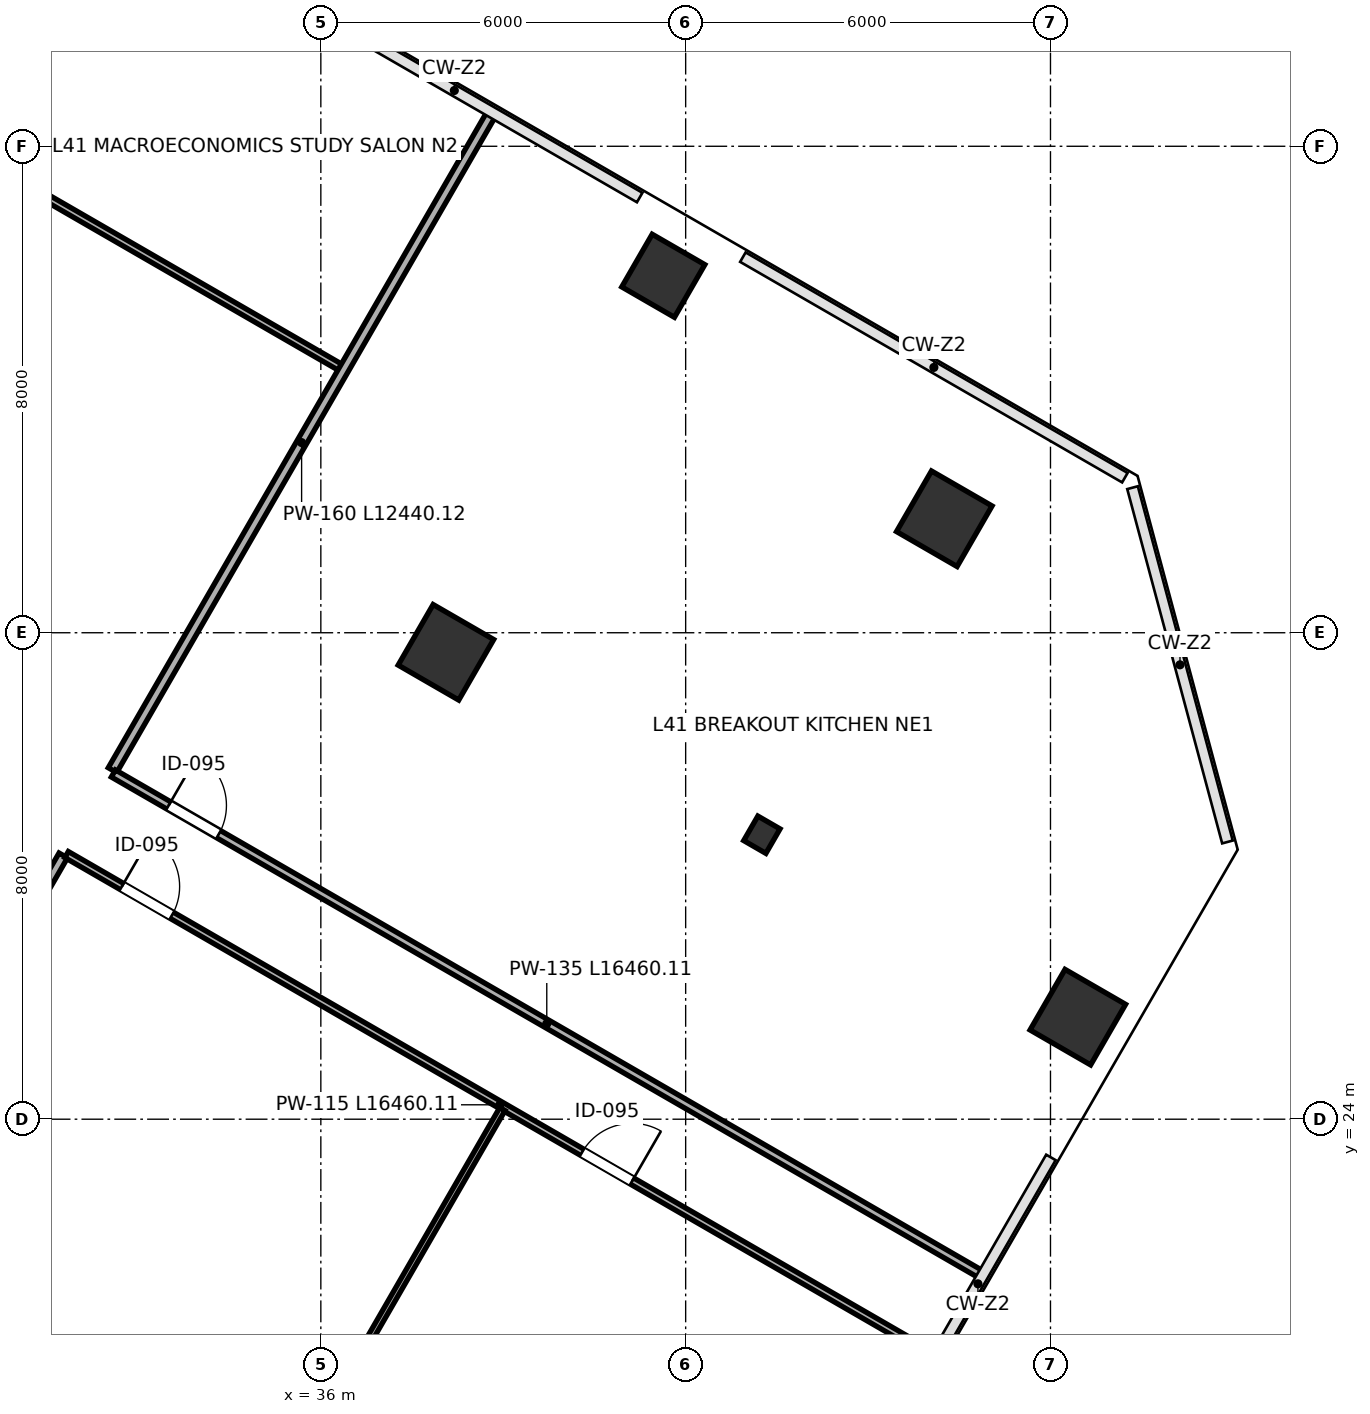
"""IFC4 building model, lengths in metres.
Left out: names, types, materials, properties, quantities, classifications, styles, units other than length and angle.
Written with IfcOpenShell. Run it as: python <this file> out.ifc"""

import sys

from ifc_helpers import new_model, si_unit, direction, frame, frame_2d, origin, origin_2d, place, context, subcontext, project, spatial, rectangle, i_section, extrude, clip, halfspace, source, transform, mapped, element, fill, save


model = new_model("IFC4")
c1 = context("Model", 3, precision=1e-05, world=origin(), true_north=direction((0.0, 1.0)))
c2 = subcontext(c1, "Body", "Model", "MODEL_VIEW")
j1 = project(units=[si_unit("LENGTHUNIT", "METRE"), si_unit("PLANEANGLEUNIT", "RADIAN")], contexts=[c1])
p1 = place(None, origin())
s1 = spatial("IfcSite", under=j1, at=p1, CompositionType="ELEMENT")
p2 = place(p1, origin())
s2 = spatial("IfcBuilding", under=s1, at=p2, CompositionType="ELEMENT")
p3 = place(p2, frame((0.0, 0.0, 183.4)))
s3 = spatial("IfcBuildingStorey", under=s2, at=p3, CompositionType="ELEMENT", Elevation=183.4)
p4 = place(p3, frame((33.838, 42.37, 0.0), z_axis=(0.103476944298, -0.128701240969, 0.986269999834), x_axis=(-0.98392787464, -0.158328979187, 0.082570405455)))
e1 = element("IfcColumn", 1, at=p4, inside=s3, PredefinedType="COLUMN", context=c2, shape_type="Clipping", body=[
    clip(clip(extrude(rectangle(XDim=1.0, YDim=1.0, at=origin_2d()), origin(), (0.0, 0.0, 1.0), 4.259), halfspace(frame((0.0, 0.0, 0.115), z_axis=(0.0, 0.0, -1.0), x_axis=(1.0, 0.0, 0.0)), False)), halfspace(frame((0.0, 0.0, 4.144), z_axis=(0.0, 0.0, 1.0), x_axis=(1.0, 0.0, 0.0)), False)),
])
p5 = place(p3, frame((38.057, 31.678, 0.0), z_axis=(-0.00698872096, -0.169390556383, 0.985524224556), x_axis=(-0.844976144841, 0.528043382637, 0.084767332759)))
e2 = element("IfcColumn", 2, at=p5, inside=s3, PredefinedType="COLUMN", context=c2, shape_type="Clipping", body=[
    clip(clip(extrude(rectangle(XDim=1.15, YDim=1.15, at=origin_2d()), origin(), (0.0, 0.0, 1.0), 4.262), halfspace(frame((0.0, 0.0, 0.136), z_axis=(0.0, 0.0, -1.0), x_axis=(1.0, 0.0, 0.0)), False)), halfspace(frame((0.0, 0.0, 4.126), z_axis=(0.0, 0.0, 1.0), x_axis=(1.0, 0.0, 0.0)), False)),
])
p6 = place(p3, frame((41.632, 37.87, 0.0), z_axis=(0.055146883204, -0.205593941504, 0.977082367301), x_axis=(-0.963025410697, 0.247496558509, 0.106430784445)))
e3 = element("IfcColumn", 3, at=p6, inside=s3, PredefinedType="COLUMN", context=c2, shape_type="Clipping", body=[
    clip(clip(extrude(rectangle(XDim=1.0, YDim=1.0, at=origin_2d()), origin(), (0.0, 0.0, 1.0), 4.299), halfspace(frame((0.0, 0.0, 0.15), z_axis=(0.0, 0.0, -1.0), x_axis=(1.0, 0.0, 0.0)), False)), halfspace(frame((0.0, 0.0, 4.149), z_axis=(0.0, 0.0, 1.0), x_axis=(1.0, 0.0, 0.0)), False)),
])
p7 = place(p3, frame((43.253, 28.678, 0.0), z_axis=(-0.038418366003, -0.219517330227, 0.974851871252), x_axis=(-0.769030881338, 0.629424774115, 0.111426914518)))
e4 = element("IfcColumn", 4, at=p7, inside=s3, PredefinedType="COLUMN", context=c2, shape_type="Clipping", body=[
    clip(clip(extrude(i_section(OverallWidth=0.421, OverallDepth=0.465, WebThickness=0.045, FlangeThickness=0.072, FilletRadius=0.015, at=origin_2d()), origin(), (0.0, 0.0, 1.0), 4.309), halfspace(frame((0.0, 0.0, 0.071), z_axis=(0.0, 0.0, -1.0), x_axis=(1.0, 0.0, 0.0)), False)), halfspace(frame((0.0, 0.0, 4.238), z_axis=(0.0, 0.0, 1.0), x_axis=(1.0, 0.0, 0.0)), False)),
])
p8 = place(p3, frame((46.253, 33.875, 0.0), z_axis=(0.01345185815, -0.24939407307, 0.968308651118), x_axis=(-0.89084486105, 0.436807560028, 0.124878296924)))
e5 = element("IfcColumn", 5, at=p8, inside=s3, PredefinedType="COLUMN", context=c2, shape_type="Clipping", body=[
    clip(clip(extrude(rectangle(XDim=1.15, YDim=1.15, at=origin_2d()), origin(), (0.0, 0.0, 1.0), 4.338), halfspace(frame((0.0, 0.0, 0.203), z_axis=(0.0, 0.0, -1.0), x_axis=(1.0, 0.0, 0.0)), False)), halfspace(frame((0.0, 0.0, 4.134), z_axis=(0.0, 0.0, 1.0), x_axis=(1.0, 0.0, 0.0)), False)),
])
p9 = place(p3, frame((48.45, 25.678, 0.0), z_axis=(-0.068990436468, -0.267582340635, 0.961061918222), x_axis=(-0.718629272575, 0.681529141902, 0.138166556503)))
e6 = element("IfcColumn", 6, at=p9, inside=s3, PredefinedType="COLUMN", context=c2, shape_type="Clipping", body=[
    clip(clip(extrude(rectangle(XDim=1.15, YDim=1.15, at=origin_2d()), origin(), (0.0, 0.0, 1.0), 4.37), halfspace(frame((0.0, 0.0, 0.227), z_axis=(0.0, 0.0, -1.0), x_axis=(1.0, 0.0, 0.0)), False)), halfspace(frame((0.0, 0.0, 4.144), z_axis=(0.0, 0.0, 1.0), x_axis=(1.0, 0.0, 0.0)), False)),
])
p10 = place(p3, frame((13.23, 49.696, 0.0), z_axis=(0.0, 0.0, 1.0), x_axis=(0.866026251752, -0.499998531275, 0.0)))
e7 = element("IfcWall", 7, at=p10, inside=s3, PredefinedType="PARTITIONING", context=c2, shape_type="SweptSolid", body=[
    extrude(rectangle(XDim=26.69, YDim=0.115, at=frame_2d((13.345, 0.0))), origin(), (0.0, 0.0, 1.0), 3.96),
])
p11 = place(p10, frame((2.1, 0.0, 0.0)))
e8 = element("IfcOpeningElement", 8, at=p11, cuts=e7, PredefinedType="OPENING", context=c2, shape_type="SweptSolid", body=[
    extrude(rectangle(XDim=0.95, YDim=2.15, at=frame_2d((0.475, 1.075))), frame((0.0, 0.067, 0.0), z_axis=(0.0, -1.0, 0.0), x_axis=(1.0, 0.0, 0.0)), (0.0, 0.0, 1.0), 0.135),
])
p12 = place(p10, frame((18.2, 0.0, 0.0)))
e9 = element("IfcOpeningElement", 9, at=p12, cuts=e7, PredefinedType="OPENING", context=c2, shape_type="SweptSolid", body=[
    extrude(rectangle(XDim=0.95, YDim=2.15, at=frame_2d((0.475, 1.075))), frame((0.0, 0.067, 0.0), z_axis=(0.0, -1.0, 0.0), x_axis=(1.0, 0.0, 0.0)), (0.0, 0.0, 1.0), 0.135),
])
p13 = place(p3, frame((32.574, 29.74, 0.0), z_axis=(0.0, 0.0, 1.0), x_axis=(0.499986899807, 0.866032967052, 0.0)))
e10 = element("IfcWall", 10, at=p13, inside=s3, PredefinedType="PARTITIONING", context=c2, shape_type="SweptSolid", body=[
    extrude(rectangle(XDim=12.44, YDim=0.16, at=frame_2d((6.22, 0.0))), origin(), (0.0, 0.0, 1.0), 3.195),
])
p14 = place(p3, frame((21.774, 11.034, 0.0), z_axis=(0.0, 0.0, 1.0), x_axis=(0.500008037328, 0.866020763381, 0.0)))
e11 = element("IfcWall", 11, at=p14, inside=s3, PredefinedType="PARTITIONING", context=c2, shape_type="SweptSolid", body=[
    extrude(rectangle(XDim=19.98, YDim=0.16, at=frame_2d((9.99, 0.0))), origin(), (0.0, 0.0, 1.0), 3.96),
])
p15 = place(p3, frame((32.588, 29.686, 0.0), z_axis=(0.0, 0.0, 1.0), x_axis=(0.86602750728, -0.499996356621, 0.0)))
e12 = element("IfcWall", 12, at=p15, inside=s3, PredefinedType="PARTITIONING", context=c2, shape_type="SweptSolid", body=[
    extrude(rectangle(XDim=16.46, YDim=0.135, at=frame_2d((8.23, 0.0))), origin(), (0.0, 0.0, 1.0), 3.96),
])
p16 = place(p15, frame((1.05, 0.0, 0.0)))
e13 = element("IfcOpeningElement", 13, at=p16, cuts=e12, PredefinedType="OPENING", context=c2, shape_type="SweptSolid", body=[
    extrude(rectangle(XDim=0.95, YDim=2.15, at=frame_2d((0.475, 1.075))), frame((0.0, 0.078, 0.0), z_axis=(0.0, -1.0, 0.0), x_axis=(1.0, 0.0, 0.0)), (0.0, 0.0, 1.0), 0.155),
])
p17 = place(p3, frame((31.818, 28.352, 0.0), z_axis=(0.0, 0.0, 1.0), x_axis=(0.86602750728, -0.499996356621, 0.0)))
e14 = element("IfcWall", 14, at=p17, inside=s3, PredefinedType="PARTITIONING", context=c2, shape_type="SweptSolid", body=[
    extrude(rectangle(XDim=16.46, YDim=0.115, at=frame_2d((8.23, 0.0))), origin(), (0.0, 0.0, 1.0), 3.96),
])
p18 = place(p17, frame((1.05, 0.0, 0.0)))
e15 = element("IfcOpeningElement", 15, at=p18, cuts=e14, PredefinedType="OPENING", context=c2, shape_type="SweptSolid", body=[
    extrude(rectangle(XDim=0.95, YDim=2.15, at=frame_2d((0.475, 1.075))), frame((0.0, 0.067, 0.0), z_axis=(0.0, -1.0, 0.0), x_axis=(1.0, 0.0, 0.0)), (0.0, 0.0, 1.0), 0.135),
])
p19 = place(p17, frame((9.79, 0.0, 0.0)))
e16 = element("IfcOpeningElement", 16, at=p19, cuts=e14, PredefinedType="OPENING", context=c2, shape_type="SweptSolid", body=[
    extrude(rectangle(XDim=0.95, YDim=2.15, at=frame_2d((0.475, 1.075))), frame((0.0, 0.067, 0.0), z_axis=(0.0, -1.0, 0.0), x_axis=(1.0, 0.0, 0.0)), (0.0, 0.0, 1.0), 0.135),
])
p20 = place(p3, frame((31.196, 10.675, 0.0), z_axis=(0.0, 0.0, 1.0), x_axis=(0.500001880682, 0.866024317969, 0.0)))
e17 = element("IfcWall", 17, at=p20, inside=s3, PredefinedType="PARTITIONING", context=c2, shape_type="SweptSolid", body=[
    extrude(rectangle(XDim=15.58, YDim=0.1, at=frame_2d((7.79, 0.0))), origin(), (0.0, 0.0, 1.0), 3.96),
])
m1 = source(origin(), c2, "Body", "SweptSolid", [
    extrude(rectangle(XDim=0.95, YDim=2.15, at=frame_2d((0.475, 1.075))), frame((0.0, 0.025, 0.0), z_axis=(0.0, -1.0, 0.0), x_axis=(1.0, 0.0, 0.0)), (0.0, 0.0, 1.0), 0.05),
])
p21 = place(p16, origin())
e18 = element("IfcDoor", 18, at=p21, inside=s3, OperationType="SINGLE_SWING_LEFT", PredefinedType="DOOR", context=c2, shape_type="MappedRepresentation", body=[
    mapped(m1, transform((0.0, 0.0, 0.0), scale=1.0)),
])
fill(e13, e18)
p22 = place(p18, origin())
e19 = element("IfcDoor", 19, at=p22, inside=s3, OperationType="SINGLE_SWING_LEFT", PredefinedType="DOOR", context=c2, shape_type="MappedRepresentation", body=[
    mapped(m1, transform((0.0, 0.0, 0.0), scale=1.0)),
])
fill(e15, e19)
p23 = place(p19, origin())
e20 = element("IfcDoor", 20, at=p23, inside=s3, OperationType="SINGLE_SWING_RIGHT", PredefinedType="DOOR", context=c2, shape_type="MappedRepresentation", body=[
    mapped(m1, transform((0.0, 0.0, 0.0), scale=1.0)),
])
fill(e16, e20)
save(model, sys.argv[1])
